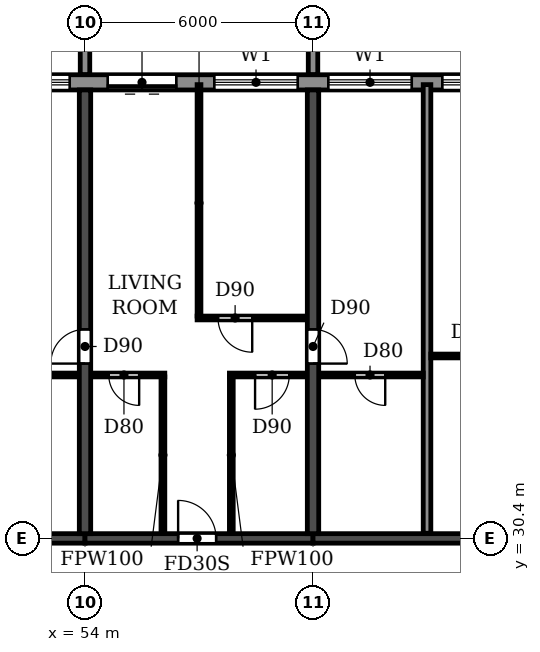
"""IFC4 building model, lengths in metres.
Left out: names, types, materials, properties, quantities, classifications, styles, units other than length and angle.
Written with IfcOpenShell. Run it as: python <this file> out.ifc"""

import sys

from ifc_helpers import new_model, si_unit, direction, frame, frame_2d, origin, place, context, subcontext, project, spatial, polyline, rectangle, outline, extrude, source, transform, mapped, element, fill, save


model = new_model("IFC4")
c1 = context("Model", 3, precision=1e-05, world=origin(), true_north=direction((0.0, 1.0)))
c2 = subcontext(c1, "Body", "Model", "MODEL_VIEW")
j1 = project(units=[si_unit("LENGTHUNIT", "METRE"), si_unit("PLANEANGLEUNIT", "RADIAN")], contexts=[c1])
p1 = place(None, origin())
s1 = spatial("IfcSite", under=j1, at=p1, CompositionType="ELEMENT")
p2 = place(p1, origin())
s2 = spatial("IfcBuilding", under=s1, at=p2, CompositionType="ELEMENT")
p3 = place(p2, frame((0.0, 0.0, 132.3)))
s3 = spatial("IfcBuildingStorey", under=s2, at=p3, CompositionType="ELEMENT", Elevation=132.3)
p4 = place(p3, frame((54.0, 30.525, 0.0), z_axis=(0.0, 0.0, 1.0), x_axis=(0.0, 1.0, 0.0)))
e1 = element("IfcWall", 1, at=p4, inside=s3, PredefinedType="SHEAR", context=c2, shape_type="SweptSolid", body=[
    extrude(rectangle(XDim=11.675, YDim=0.3, at=frame_2d((5.837, 0.0))), origin(), (0.0, 0.0, 1.0), 3.07),
])
p5 = place(p4, frame((4.475, 0.0, 0.0)))
e2 = element("IfcOpeningElement", 2, at=p5, cuts=e1, PredefinedType="OPENING", context=c2, shape_type="SweptSolid", body=[
    extrude(rectangle(XDim=0.9, YDim=2.1, at=frame_2d((0.45, 1.05))), frame((0.0, 0.16, 0.0), z_axis=(0.0, -1.0, 0.0), x_axis=(1.0, 0.0, 0.0)), (0.0, 0.0, 1.0), 0.32),
])
p6 = place(p3, frame((60.0, 30.525, 0.0), z_axis=(0.0, 0.0, 1.0), x_axis=(0.0, 1.0, 0.0)))
e3 = element("IfcWall", 3, at=p6, inside=s3, PredefinedType="SHEAR", context=c2, shape_type="SweptSolid", body=[
    extrude(rectangle(XDim=11.675, YDim=0.3, at=frame_2d((5.837, 0.0))), origin(), (0.0, 0.0, 1.0), 3.07),
])
p7 = place(p6, frame((4.475, 0.0, 0.0)))
e4 = element("IfcOpeningElement", 4, at=p7, cuts=e3, PredefinedType="OPENING", context=c2, shape_type="SweptSolid", body=[
    extrude(rectangle(XDim=0.9, YDim=2.1, at=frame_2d((0.45, 1.05))), frame((0.0, 0.16, 0.0), z_axis=(0.0, -1.0, 0.0), x_axis=(1.0, 0.0, 0.0)), (0.0, 0.0, 1.0), 0.32),
])
p8 = place(p3, frame((48.0, 30.4, 0.0), z_axis=(0.0, 0.0, 1.0), x_axis=(1.0, 0.0, 0.0)))
e5 = element("IfcWall", 5, at=p8, inside=s3, PredefinedType="SHEAR", context=c2, shape_type="SweptSolid", body=[
    extrude(rectangle(XDim=6.0, YDim=0.25, at=frame_2d((3.0, 0.0))), origin(), (0.0, 0.0, 1.0), 2.47),
])
p9 = place(p3, frame((54.0, 30.4, 0.0), z_axis=(0.0, 0.0, 1.0), x_axis=(1.0, 0.0, 0.0)))
e6 = element("IfcWall", 6, at=p9, inside=s3, PredefinedType="SHEAR", context=c2, shape_type="SweptSolid", body=[
    extrude(rectangle(XDim=6.0, YDim=0.25, at=frame_2d((3.0, 0.0))), origin(), (0.0, 0.0, 1.0), 2.47),
])
p10 = place(p9, frame((2.45, 0.0, 0.0)))
e7 = element("IfcOpeningElement", 7, at=p10, cuts=e6, PredefinedType="OPENING", context=c2, shape_type="SweptSolid", body=[
    extrude(rectangle(XDim=1.0, YDim=2.1, at=frame_2d((0.5, 1.05))), frame((0.0, 0.135, 0.0), z_axis=(0.0, -1.0, 0.0), x_axis=(1.0, 0.0, 0.0)), (0.0, 0.0, 1.0), 0.27),
])
p11 = place(p3, frame((60.0, 30.4, 0.0), z_axis=(0.0, 0.0, 1.0), x_axis=(1.0, 0.0, 0.0)))
e8 = element("IfcWall", 8, at=p11, inside=s3, PredefinedType="SHEAR", context=c2, shape_type="SweptSolid", body=[
    extrude(rectangle(XDim=6.0, YDim=0.25, at=frame_2d((3.0, 0.0))), origin(), (0.0, 0.0, 1.0), 2.47),
])
p12 = place(p3, frame((85.317, 42.4, 0.0), z_axis=(0.0, 0.0, 1.0), x_axis=(-1.0, 0.0, 0.0)))
e9 = element("IfcWall", 9, at=p12, inside=s3, PredefinedType="STANDARD", context=c2, shape_type="SweptSolid", body=[
    extrude(rectangle(XDim=68.634, YDim=0.4, at=frame_2d((34.317, 0.0))), origin(), (0.0, 0.0, 1.0), 3.07),
])
p13 = place(p12, frame((64.917, 0.0, 0.0)))
e10 = element("IfcOpeningElement", 10, at=p13, cuts=e9, PredefinedType="OPENING", context=c2, shape_type="SweptSolid", body=[
    extrude(rectangle(XDim=1.8, YDim=2.4, at=frame_2d((0.9, 1.2))), frame((0.0, 0.21, 0.0), z_axis=(0.0, -1.0, 0.0), x_axis=(1.0, 0.0, 0.0)), (0.0, 0.0, 1.0), 0.42),
])
p14 = place(p12, frame((61.717, 0.0, 0.9)))
e11 = element("IfcOpeningElement", 11, at=p14, cuts=e9, PredefinedType="OPENING", context=c2, shape_type="SweptSolid", body=[
    extrude(rectangle(XDim=2.2, YDim=1.5, at=frame_2d((1.1, 0.75))), frame((0.0, 0.21, 0.0), z_axis=(0.0, -1.0, 0.0), x_axis=(1.0, 0.0, 0.0)), (0.0, 0.0, 1.0), 0.42),
])
p15 = place(p12, frame((58.717, 0.0, 0.9)))
e12 = element("IfcOpeningElement", 12, at=p15, cuts=e9, PredefinedType="OPENING", context=c2, shape_type="SweptSolid", body=[
    extrude(rectangle(XDim=2.2, YDim=1.5, at=frame_2d((1.1, 0.75))), frame((0.0, 0.21, 0.0), z_axis=(0.0, -1.0, 0.0), x_axis=(1.0, 0.0, 0.0)), (0.0, 0.0, 1.0), 0.42),
])
p16 = place(p12, frame((55.717, 0.0, 0.9)))
e13 = element("IfcOpeningElement", 13, at=p16, cuts=e9, PredefinedType="OPENING", context=c2, shape_type="SweptSolid", body=[
    extrude(rectangle(XDim=2.2, YDim=1.5, at=frame_2d((1.1, 0.75))), frame((0.0, 0.21, 0.0), z_axis=(0.0, -1.0, 0.0), x_axis=(1.0, 0.0, 0.0)), (0.0, 0.0, 1.0), 0.42),
])
p17 = place(p12, frame((52.917, 0.0, 0.0)))
e14 = element("IfcOpeningElement", 14, at=p17, cuts=e9, PredefinedType="OPENING", context=c2, shape_type="SweptSolid", body=[
    extrude(rectangle(XDim=1.8, YDim=2.4, at=frame_2d((0.9, 1.2))), frame((0.0, 0.21, 0.0), z_axis=(0.0, -1.0, 0.0), x_axis=(1.0, 0.0, 0.0)), (0.0, 0.0, 1.0), 0.42),
])
p18 = place(p12, frame((49.717, 0.0, 0.9)))
e15 = element("IfcOpeningElement", 15, at=p18, cuts=e9, PredefinedType="OPENING", context=c2, shape_type="SweptSolid", body=[
    extrude(rectangle(XDim=2.2, YDim=1.5, at=frame_2d((1.1, 0.75))), frame((0.0, 0.21, 0.0), z_axis=(0.0, -1.0, 0.0), x_axis=(1.0, 0.0, 0.0)), (0.0, 0.0, 1.0), 0.42),
])
p19 = place(p12, frame((46.717, 0.0, 0.9)))
e16 = element("IfcOpeningElement", 16, at=p19, cuts=e9, PredefinedType="OPENING", context=c2, shape_type="SweptSolid", body=[
    extrude(rectangle(XDim=2.2, YDim=1.5, at=frame_2d((1.1, 0.75))), frame((0.0, 0.21, 0.0), z_axis=(0.0, -1.0, 0.0), x_axis=(1.0, 0.0, 0.0)), (0.0, 0.0, 1.0), 0.42),
])
p20 = place(p12, frame((43.917, 0.0, 0.0)))
e17 = element("IfcOpeningElement", 17, at=p20, cuts=e9, PredefinedType="OPENING", context=c2, shape_type="SweptSolid", body=[
    extrude(rectangle(XDim=1.8, YDim=2.4, at=frame_2d((0.9, 1.2))), frame((0.0, 0.21, 0.0), z_axis=(0.0, -1.0, 0.0), x_axis=(1.0, 0.0, 0.0)), (0.0, 0.0, 1.0), 0.42),
])
p21 = place(p12, frame((40.917, 0.0, 0.0)))
e18 = element("IfcOpeningElement", 18, at=p21, cuts=e9, PredefinedType="OPENING", context=c2, shape_type="SweptSolid", body=[
    extrude(rectangle(XDim=1.8, YDim=2.4, at=frame_2d((0.9, 1.2))), frame((0.0, 0.21, 0.0), z_axis=(0.0, -1.0, 0.0), x_axis=(1.0, 0.0, 0.0)), (0.0, 0.0, 1.0), 0.42),
])
p22 = place(p12, frame((37.717, 0.0, 0.9)))
e19 = element("IfcOpeningElement", 19, at=p22, cuts=e9, PredefinedType="OPENING", context=c2, shape_type="SweptSolid", body=[
    extrude(rectangle(XDim=2.2, YDim=1.5, at=frame_2d((1.1, 0.75))), frame((0.0, 0.21, 0.0), z_axis=(0.0, -1.0, 0.0), x_axis=(1.0, 0.0, 0.0)), (0.0, 0.0, 1.0), 0.42),
])
p23 = place(p12, frame((34.717, 0.0, 0.9)))
e20 = element("IfcOpeningElement", 20, at=p23, cuts=e9, PredefinedType="OPENING", context=c2, shape_type="SweptSolid", body=[
    extrude(rectangle(XDim=2.2, YDim=1.5, at=frame_2d((1.1, 0.75))), frame((0.0, 0.21, 0.0), z_axis=(0.0, -1.0, 0.0), x_axis=(1.0, 0.0, 0.0)), (0.0, 0.0, 1.0), 0.42),
])
p24 = place(p12, frame((31.717, 0.0, 0.9)))
e21 = element("IfcOpeningElement", 21, at=p24, cuts=e9, PredefinedType="OPENING", context=c2, shape_type="SweptSolid", body=[
    extrude(rectangle(XDim=2.2, YDim=1.5, at=frame_2d((1.1, 0.75))), frame((0.0, 0.21, 0.0), z_axis=(0.0, -1.0, 0.0), x_axis=(1.0, 0.0, 0.0)), (0.0, 0.0, 1.0), 0.42),
])
p25 = place(p12, frame((28.917, 0.0, 0.0)))
e22 = element("IfcOpeningElement", 22, at=p25, cuts=e9, PredefinedType="OPENING", context=c2, shape_type="SweptSolid", body=[
    extrude(rectangle(XDim=1.8, YDim=2.4, at=frame_2d((0.9, 1.2))), frame((0.0, 0.21, 0.0), z_axis=(0.0, -1.0, 0.0), x_axis=(1.0, 0.0, 0.0)), (0.0, 0.0, 1.0), 0.42),
])
p26 = place(p12, frame((25.717, 0.0, 0.9)))
e23 = element("IfcOpeningElement", 23, at=p26, cuts=e9, PredefinedType="OPENING", context=c2, shape_type="SweptSolid", body=[
    extrude(rectangle(XDim=2.2, YDim=1.5, at=frame_2d((1.1, 0.75))), frame((0.0, 0.21, 0.0), z_axis=(0.0, -1.0, 0.0), x_axis=(1.0, 0.0, 0.0)), (0.0, 0.0, 1.0), 0.42),
])
p27 = place(p12, frame((22.717, 0.0, 0.9)))
e24 = element("IfcOpeningElement", 24, at=p27, cuts=e9, PredefinedType="OPENING", context=c2, shape_type="SweptSolid", body=[
    extrude(rectangle(XDim=2.2, YDim=1.5, at=frame_2d((1.1, 0.75))), frame((0.0, 0.21, 0.0), z_axis=(0.0, -1.0, 0.0), x_axis=(1.0, 0.0, 0.0)), (0.0, 0.0, 1.0), 0.42),
])
p28 = place(p12, frame((19.717, 0.0, 0.9)))
e25 = element("IfcOpeningElement", 25, at=p28, cuts=e9, PredefinedType="OPENING", context=c2, shape_type="SweptSolid", body=[
    extrude(rectangle(XDim=2.2, YDim=1.5, at=frame_2d((1.1, 0.75))), frame((0.0, 0.21, 0.0), z_axis=(0.0, -1.0, 0.0), x_axis=(1.0, 0.0, 0.0)), (0.0, 0.0, 1.0), 0.42),
])
p29 = place(p12, frame((16.717, 0.0, 0.9)))
e26 = element("IfcOpeningElement", 26, at=p29, cuts=e9, PredefinedType="OPENING", context=c2, shape_type="SweptSolid", body=[
    extrude(rectangle(XDim=2.2, YDim=1.5, at=frame_2d((1.1, 0.75))), frame((0.0, 0.21, 0.0), z_axis=(0.0, -1.0, 0.0), x_axis=(1.0, 0.0, 0.0)), (0.0, 0.0, 1.0), 0.42),
])
p30 = place(p12, frame((13.917, 0.0, 0.0)))
e27 = element("IfcOpeningElement", 27, at=p30, cuts=e9, PredefinedType="OPENING", context=c2, shape_type="SweptSolid", body=[
    extrude(rectangle(XDim=1.8, YDim=2.4, at=frame_2d((0.9, 1.2))), frame((0.0, 0.21, 0.0), z_axis=(0.0, -1.0, 0.0), x_axis=(1.0, 0.0, 0.0)), (0.0, 0.0, 1.0), 0.42),
])
p31 = place(p12, frame((10.717, 0.0, 0.9)))
e28 = element("IfcOpeningElement", 28, at=p31, cuts=e9, PredefinedType="OPENING", context=c2, shape_type="SweptSolid", body=[
    extrude(rectangle(XDim=2.2, YDim=1.5, at=frame_2d((1.1, 0.75))), frame((0.0, 0.21, 0.0), z_axis=(0.0, -1.0, 0.0), x_axis=(1.0, 0.0, 0.0)), (0.0, 0.0, 1.0), 0.42),
])
p32 = place(p12, frame((7.917, 0.0, 0.0)))
e29 = element("IfcOpeningElement", 29, at=p32, cuts=e9, PredefinedType="OPENING", context=c2, shape_type="SweptSolid", body=[
    extrude(rectangle(XDim=1.8, YDim=2.4, at=frame_2d((0.9, 1.2))), frame((0.0, 0.21, 0.0), z_axis=(0.0, -1.0, 0.0), x_axis=(1.0, 0.0, 0.0)), (0.0, 0.0, 1.0), 0.42),
])
p33 = place(p12, frame((4.717, 0.0, 0.9)))
e30 = element("IfcOpeningElement", 30, at=p33, cuts=e9, PredefinedType="OPENING", context=c2, shape_type="SweptSolid", body=[
    extrude(rectangle(XDim=2.2, YDim=1.5, at=frame_2d((1.1, 0.75))), frame((0.0, 0.21, 0.0), z_axis=(0.0, -1.0, 0.0), x_axis=(1.0, 0.0, 0.0)), (0.0, 0.0, 1.0), 0.42),
])
p34 = place(p12, frame((1.917, 0.0, 0.0)))
e31 = element("IfcOpeningElement", 31, at=p34, cuts=e9, PredefinedType="OPENING", context=c2, shape_type="SweptSolid", body=[
    extrude(rectangle(XDim=1.8, YDim=2.4, at=frame_2d((0.9, 1.2))), frame((0.0, 0.21, 0.0), z_axis=(0.0, -1.0, 0.0), x_axis=(1.0, 0.0, 0.0)), (0.0, 0.0, 1.0), 0.42),
])
m1 = source(origin(), c2, "Body", "SweptSolid", [
    extrude(outline(polyline([(0.0, 0.0), (0.25, 0.0), (0.25, 3.1), (0.0, 3.1), (0.0, 0.0)])), origin(), (0.0, 0.0, 1.0), 3.1),
])
for number, where in (
    (32, (53.875, 42.6, 0.0)),
    (33, (59.875, 42.6, 0.0)),
):
    element("IfcWall", number, at=place(p3, frame(where)), inside=s3, PredefinedType="STANDARD", context=c2, shape_type="MappedRepresentation", body=[
        mapped(m1, transform((0.0, 0.0, 0.0))),
    ])
p35 = place(p3, frame((63.0, 30.535, 0.0), z_axis=(0.0, 0.0, 1.0), x_axis=(0.0, 1.0, 0.0)))
e34 = element("IfcWall", 34, at=p35, inside=s3, PredefinedType="PARTITIONING", context=c2, shape_type="SweptSolid", body=[
    extrude(rectangle(XDim=11.805, YDim=0.2, at=frame_2d((5.903, 0.0))), origin(), (0.0, 0.0, 1.0), 3.07),
])
p36 = place(p3, frame((51.1, 34.7, 0.0), z_axis=(0.0, 0.0, 1.0), x_axis=(1.0, 0.0, 0.0)))
e35 = element("IfcWall", 35, at=p36, inside=s3, PredefinedType="PARTITIONING", context=c2, shape_type="SweptSolid", body=[
    extrude(rectangle(XDim=2.74, YDim=0.1, at=frame_2d((1.37, 0.0))), origin(), (0.0, 0.0, 1.0), 3.07),
])
p37 = place(p36, frame((1.0, 0.0, 0.0)))
e36 = element("IfcOpeningElement", 36, at=p37, cuts=e35, PredefinedType="OPENING", context=c2, shape_type="SweptSolid", body=[
    extrude(rectangle(XDim=0.8, YDim=2.1, at=frame_2d((0.4, 1.05))), frame((0.0, 0.06, 0.0), z_axis=(0.0, -1.0, 0.0), x_axis=(1.0, 0.0, 0.0)), (0.0, 0.0, 1.0), 0.12),
])
p38 = place(p3, frame((54.16, 34.7, 0.0), z_axis=(0.0, 0.0, 1.0), x_axis=(1.0, 0.0, 0.0)))
e37 = element("IfcWall", 37, at=p38, inside=s3, PredefinedType="PARTITIONING", context=c2, shape_type="SweptSolid", body=[
    extrude(rectangle(XDim=1.94, YDim=0.1, at=frame_2d((0.97, 0.0))), origin(), (0.0, 0.0, 1.0), 3.07),
])
p39 = place(p38, frame((0.465, 0.0, 0.0)))
e38 = element("IfcOpeningElement", 38, at=p39, cuts=e37, PredefinedType="OPENING", context=c2, shape_type="SweptSolid", body=[
    extrude(rectangle(XDim=0.8, YDim=2.1, at=frame_2d((0.4, 1.05))), frame((0.0, 0.06, 0.0), z_axis=(0.0, -1.0, 0.0), x_axis=(1.0, 0.0, 0.0)), (0.0, 0.0, 1.0), 0.12),
])
p40 = place(p3, frame((57.8, 34.7, 0.0), z_axis=(0.0, 0.0, 1.0), x_axis=(1.0, 0.0, 0.0)))
e39 = element("IfcWall", 39, at=p40, inside=s3, PredefinedType="PARTITIONING", context=c2, shape_type="SweptSolid", body=[
    extrude(rectangle(XDim=2.04, YDim=0.1, at=frame_2d((1.02, 0.0))), origin(), (0.0, 0.0, 1.0), 3.07),
])
p41 = place(p40, frame((0.675, 0.0, 0.0)))
e40 = element("IfcOpeningElement", 40, at=p41, cuts=e39, PredefinedType="OPENING", context=c2, shape_type="SweptSolid", body=[
    extrude(rectangle(XDim=0.9, YDim=2.1, at=frame_2d((0.45, 1.05))), frame((0.0, 0.06, 0.0), z_axis=(0.0, -1.0, 0.0), x_axis=(1.0, 0.0, 0.0)), (0.0, 0.0, 1.0), 0.12),
])
p42 = place(p3, frame((60.16, 34.7, 0.0), z_axis=(0.0, 0.0, 1.0), x_axis=(1.0, 0.0, 0.0)))
e41 = element("IfcWall", 41, at=p42, inside=s3, PredefinedType="PARTITIONING", context=c2, shape_type="SweptSolid", body=[
    extrude(rectangle(XDim=2.74, YDim=0.1, at=frame_2d((1.37, 0.0))), origin(), (0.0, 0.0, 1.0), 3.07),
])
p43 = place(p42, frame((0.94, 0.0, 0.0)))
e42 = element("IfcOpeningElement", 42, at=p43, cuts=e41, PredefinedType="OPENING", context=c2, shape_type="SweptSolid", body=[
    extrude(rectangle(XDim=0.8, YDim=2.1, at=frame_2d((0.4, 1.05))), frame((0.0, 0.06, 0.0), z_axis=(0.0, -1.0, 0.0), x_axis=(1.0, 0.0, 0.0)), (0.0, 0.0, 1.0), 0.12),
])
p44 = place(p3, frame((63.1, 35.2, 0.0), z_axis=(0.0, 0.0, 1.0), x_axis=(1.0, 0.0, 0.0)))
e43 = element("IfcWall", 43, at=p44, inside=s3, PredefinedType="PARTITIONING", context=c2, shape_type="SweptSolid", body=[
    extrude(rectangle(XDim=2.74, YDim=0.1, at=frame_2d((1.37, 0.0))), origin(), (0.0, 0.0, 1.0), 3.07),
])
p45 = place(p44, frame((1.0, 0.0, 0.0)))
e44 = element("IfcOpeningElement", 44, at=p45, cuts=e43, PredefinedType="OPENING", context=c2, shape_type="SweptSolid", body=[
    extrude(rectangle(XDim=0.8, YDim=2.1, at=frame_2d((0.4, 1.05))), frame((0.0, 0.06, 0.0), z_axis=(0.0, -1.0, 0.0), x_axis=(1.0, 0.0, 0.0)), (0.0, 0.0, 1.0), 0.12),
])
p46 = place(p3, frame((56.95, 36.2, 0.0), z_axis=(0.0, 0.0, 1.0), x_axis=(1.0, 0.0, 0.0)))
e45 = element("IfcWall", 45, at=p46, inside=s3, PredefinedType="PARTITIONING", context=c2, shape_type="SweptSolid", body=[
    extrude(rectangle(XDim=2.89, YDim=0.1, at=frame_2d((1.445, 0.0))), origin(), (0.0, 0.0, 1.0), 3.07),
])
p47 = place(p46, frame((0.55, 0.0, 0.0)))
e46 = element("IfcOpeningElement", 46, at=p47, cuts=e45, PredefinedType="OPENING", context=c2, shape_type="SweptSolid", body=[
    extrude(rectangle(XDim=0.9, YDim=2.1, at=frame_2d((0.45, 1.05))), frame((0.0, 0.06, 0.0), z_axis=(0.0, -1.0, 0.0), x_axis=(1.0, 0.0, 0.0)), (0.0, 0.0, 1.0), 0.12),
])
p48 = place(p3, frame((56.05, 30.535, 0.0), z_axis=(0.0, 0.0, 1.0), x_axis=(0.0, 1.0, 0.0)))
e47 = element("IfcWall", 47, at=p48, inside=s3, PredefinedType="PARTITIONING", context=c2, shape_type="SweptSolid", body=[
    extrude(rectangle(XDim=4.115, YDim=0.1, at=frame_2d((2.058, 0.0))), origin(), (0.0, 0.0, 1.0), 3.07),
])
p49 = place(p3, frame((57.0, 36.25, 0.0), z_axis=(0.0, 0.0, 1.0), x_axis=(0.0, 1.0, 0.0)))
e48 = element("IfcWall", 48, at=p49, inside=s3, PredefinedType="PARTITIONING", context=c2, shape_type="SweptSolid", body=[
    extrude(rectangle(XDim=6.09, YDim=0.1, at=frame_2d((3.045, 0.0))), origin(), (0.0, 0.0, 1.0), 3.07),
])
p50 = place(p3, frame((57.85, 30.535, 0.0), z_axis=(0.0, 0.0, 1.0), x_axis=(0.0, 1.0, 0.0)))
e49 = element("IfcWall", 49, at=p50, inside=s3, PredefinedType="PARTITIONING", context=c2, shape_type="SweptSolid", body=[
    extrude(rectangle(XDim=4.115, YDim=0.1, at=frame_2d((2.058, 0.0))), origin(), (0.0, 0.0, 1.0), 3.07),
])
p51 = place(p24, origin())
e50 = element("IfcWindow", 50, at=p51, inside=s3, PartitioningType="DOUBLE_PANEL_HORIZONTAL", PredefinedType="WINDOW", context=c2, shape_type="SweptSolid", body=[
    extrude(rectangle(XDim=2.2, YDim=1.5, at=frame_2d((1.1, 0.75))), frame((0.0, 0.03, 0.0), z_axis=(0.0, -1.0, 0.0), x_axis=(1.0, 0.0, 0.0)), (0.0, 0.0, 1.0), 0.06),
])
fill(e21, e50)
p52 = place(p25, origin())
e51 = element("IfcDoor", 51, at=p52, inside=s3, OperationType="DOUBLE_DOOR_SLIDING", PredefinedType="DOOR", context=c2, shape_type="SweptSolid", body=[
    extrude(rectangle(XDim=1.8, YDim=2.4, at=frame_2d((0.9, 1.2))), frame((0.0, 0.025, 0.0), z_axis=(0.0, -1.0, 0.0), x_axis=(1.0, 0.0, 0.0)), (0.0, 0.0, 1.0), 0.05),
])
fill(e22, e51)
p53 = place(p26, origin())
e52 = element("IfcWindow", 52, at=p53, inside=s3, PartitioningType="DOUBLE_PANEL_HORIZONTAL", PredefinedType="WINDOW", context=c2, shape_type="SweptSolid", body=[
    extrude(rectangle(XDim=2.2, YDim=1.5, at=frame_2d((1.1, 0.75))), frame((0.0, 0.03, 0.0), z_axis=(0.0, -1.0, 0.0), x_axis=(1.0, 0.0, 0.0)), (0.0, 0.0, 1.0), 0.06),
])
fill(e23, e52)
p54 = place(p27, origin())
e53 = element("IfcWindow", 53, at=p54, inside=s3, PartitioningType="DOUBLE_PANEL_HORIZONTAL", PredefinedType="WINDOW", context=c2, shape_type="SweptSolid", body=[
    extrude(rectangle(XDim=2.2, YDim=1.5, at=frame_2d((1.1, 0.75))), frame((0.0, 0.03, 0.0), z_axis=(0.0, -1.0, 0.0), x_axis=(1.0, 0.0, 0.0)), (0.0, 0.0, 1.0), 0.06),
])
fill(e24, e53)
p55 = place(p28, origin())
e54 = element("IfcWindow", 54, at=p55, inside=s3, PartitioningType="DOUBLE_PANEL_HORIZONTAL", PredefinedType="WINDOW", context=c2, shape_type="SweptSolid", body=[
    extrude(rectangle(XDim=2.2, YDim=1.5, at=frame_2d((1.1, 0.75))), frame((0.0, 0.03, 0.0), z_axis=(0.0, -1.0, 0.0), x_axis=(1.0, 0.0, 0.0)), (0.0, 0.0, 1.0), 0.06),
])
fill(e25, e54)
p56 = place(p43, frame((0.8, 0.0, 0.0), z_axis=(0.0, 0.0, 1.0), x_axis=(-1.0, 0.0, 0.0)))
e55 = element("IfcDoor", 55, at=p56, inside=s3, OperationType="SINGLE_SWING_LEFT", PredefinedType="DOOR", context=c2, shape_type="SweptSolid", body=[
    extrude(rectangle(XDim=0.8, YDim=2.1, at=frame_2d((0.4, 1.05))), frame((0.0, 0.025, 0.0), z_axis=(0.0, -1.0, 0.0), x_axis=(1.0, 0.0, 0.0)), (0.0, 0.0, 1.0), 0.05),
])
fill(e42, e55)
p57 = place(p5, origin())
e56 = element("IfcDoor", 56, at=p57, inside=s3, OperationType="SINGLE_SWING_LEFT", PredefinedType="DOOR", context=c2, shape_type="SweptSolid", body=[
    extrude(rectangle(XDim=0.9, YDim=2.1, at=frame_2d((0.45, 1.05))), frame((0.0, 0.025, 0.0), z_axis=(0.0, -1.0, 0.0), x_axis=(1.0, 0.0, 0.0)), (0.0, 0.0, 1.0), 0.05),
])
fill(e2, e56)
p58 = place(p39, frame((0.8, 0.0, 0.0), z_axis=(0.0, 0.0, 1.0), x_axis=(-1.0, 0.0, 0.0)))
e57 = element("IfcDoor", 57, at=p58, inside=s3, OperationType="SINGLE_SWING_LEFT", PredefinedType="DOOR", context=c2, shape_type="SweptSolid", body=[
    extrude(rectangle(XDim=0.8, YDim=2.1, at=frame_2d((0.4, 1.05))), frame((0.0, 0.025, 0.0), z_axis=(0.0, -1.0, 0.0), x_axis=(1.0, 0.0, 0.0)), (0.0, 0.0, 1.0), 0.05),
])
fill(e38, e57)
p59 = place(p10, origin())
e58 = element("IfcDoor", 58, at=p59, inside=s3, OperationType="SINGLE_SWING_LEFT", PredefinedType="DOOR", context=c2, shape_type="SweptSolid", body=[
    extrude(rectangle(XDim=1.0, YDim=2.1, at=frame_2d((0.5, 1.05))), frame((0.0, 0.025, 0.0), z_axis=(0.0, -1.0, 0.0), x_axis=(1.0, 0.0, 0.0)), (0.0, 0.0, 1.0), 0.05),
])
fill(e7, e58)
p60 = place(p47, frame((0.9, 0.0, 0.0), z_axis=(0.0, 0.0, 1.0), x_axis=(-1.0, 0.0, 0.0)))
e59 = element("IfcDoor", 59, at=p60, inside=s3, OperationType="SINGLE_SWING_LEFT", PredefinedType="DOOR", context=c2, shape_type="SweptSolid", body=[
    extrude(rectangle(XDim=0.9, YDim=2.1, at=frame_2d((0.45, 1.05))), frame((0.0, 0.025, 0.0), z_axis=(0.0, -1.0, 0.0), x_axis=(1.0, 0.0, 0.0)), (0.0, 0.0, 1.0), 0.05),
])
fill(e46, e59)
p61 = place(p41, frame((0.9, 0.0, 0.0), z_axis=(0.0, 0.0, 1.0), x_axis=(-1.0, 0.0, 0.0)))
e60 = element("IfcDoor", 60, at=p61, inside=s3, OperationType="SINGLE_SWING_RIGHT", PredefinedType="DOOR", context=c2, shape_type="SweptSolid", body=[
    extrude(rectangle(XDim=0.9, YDim=2.1, at=frame_2d((0.45, 1.05))), frame((0.0, 0.025, 0.0), z_axis=(0.0, -1.0, 0.0), x_axis=(1.0, 0.0, 0.0)), (0.0, 0.0, 1.0), 0.05),
])
fill(e40, e60)
p62 = place(p7, frame((0.9, 0.0, 0.0), z_axis=(0.0, 0.0, 1.0), x_axis=(-1.0, 0.0, 0.0)))
e61 = element("IfcDoor", 61, at=p62, inside=s3, OperationType="SINGLE_SWING_RIGHT", PredefinedType="DOOR", context=c2, shape_type="SweptSolid", body=[
    extrude(rectangle(XDim=0.9, YDim=2.1, at=frame_2d((0.45, 1.05))), frame((0.0, 0.025, 0.0), z_axis=(0.0, -1.0, 0.0), x_axis=(1.0, 0.0, 0.0)), (0.0, 0.0, 1.0), 0.05),
])
fill(e4, e61)
save(model, sys.argv[1])
